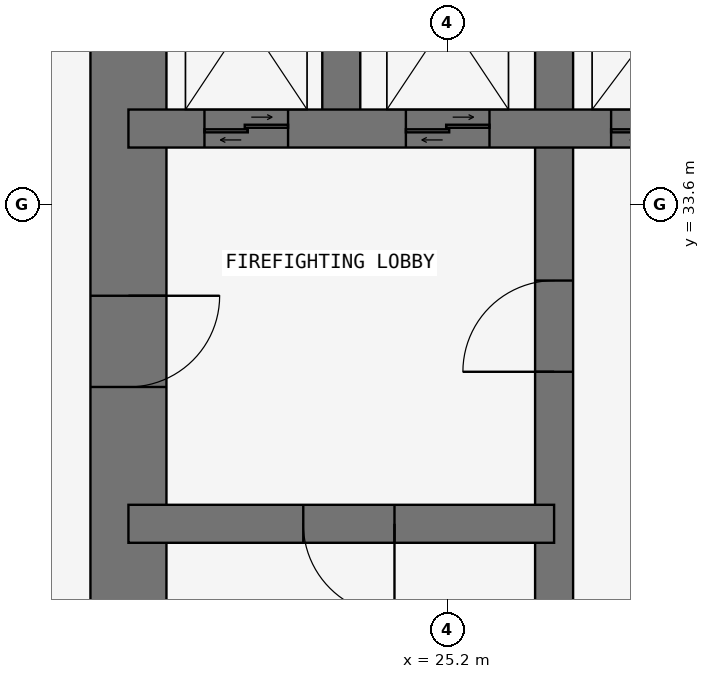
"""IFC4 building model, lengths in metres.
Left out: names, types, materials, properties, quantities, classifications, styles, units other than length and angle.
Written with IfcOpenShell. Run it as: python <this file> out.ifc"""

import sys

from ifc_helpers import new_model, si_unit, direction, frame, frame_2d, origin, place, context, subcontext, project, spatial, rectangle, extrude, element, fill, save


model = new_model("IFC4")
c1 = context("Model", 3, precision=1e-05, world=origin(), true_north=direction((0.0, 1.0)))
c2 = subcontext(c1, "Body", "Model", "MODEL_VIEW")
j1 = project(units=[si_unit("LENGTHUNIT", "METRE"), si_unit("PLANEANGLEUNIT", "RADIAN")], contexts=[c1])
p1 = place(None, origin())
s1 = spatial("IfcSite", under=j1, at=p1, CompositionType="ELEMENT")
p2 = place(p1, origin())
s2 = spatial("IfcBuilding", under=s1, at=p2, CompositionType="ELEMENT")
p3 = place(p2, frame((0.0, 0.0, 95.7)))
s3 = spatial("IfcBuildingStorey", under=s2, at=p3, CompositionType="ELEMENT", Elevation=95.7)
p4 = place(p3, frame((21.0, 37.8, 0.0), z_axis=(0.0, 0.0, 1.0), x_axis=(0.0, -1.0, 0.0)))
e1 = element("IfcWall", 1, at=p4, inside=s3, PredefinedType="SHEAR", context=c2, shape_type="SweptSolid", body=[
    extrude(rectangle(XDim=17.3, YDim=1.0, at=frame_2d((8.65, 0.0))), origin(), (0.0, 0.0, 1.0), 3.6),
])
p5 = place(p4, frame((5.4, 0.0, 0.0)))
e2 = element("IfcOpeningElement", 2, at=p5, cuts=e1, PredefinedType="OPENING", context=c2, shape_type="SweptSolid", body=[
    extrude(rectangle(XDim=1.2, YDim=2.1, at=frame_2d((0.6, 1.05))), frame((0.0, 0.51, 0.0), z_axis=(0.0, -1.0, 0.0), x_axis=(1.0, 0.0, 0.0)), (0.0, 0.0, 1.0), 1.02),
])
p6 = place(p3, frame((26.6, 21.0, 0.0), z_axis=(0.0, 0.0, 1.0), x_axis=(0.0, 1.0, 0.0)))
e3 = element("IfcWall", 3, at=p6, inside=s3, PredefinedType="SHEAR", context=c2, shape_type="SweptSolid", body=[
    extrude(rectangle(XDim=16.8, YDim=0.5, at=frame_2d((8.4, 0.0))), origin(), (0.0, 0.0, 1.0), 3.6),
])
p7 = place(p6, frame((10.4, 0.0, 0.0)))
e4 = element("IfcOpeningElement", 4, at=p7, cuts=e3, PredefinedType="OPENING", context=c2, shape_type="SweptSolid", body=[
    extrude(rectangle(XDim=1.2, YDim=2.1, at=frame_2d((0.6, 1.05))), frame((0.0, 0.26, 0.0), z_axis=(0.0, -1.0, 0.0), x_axis=(1.0, 0.0, 0.0)), (0.0, 0.0, 1.0), 0.52),
])
p8 = place(p3, frame((21.0, 29.4, 0.0), z_axis=(0.0, 0.0, 1.0), x_axis=(1.0, 0.0, 0.0)))
e5 = element("IfcWall", 5, at=p8, inside=s3, PredefinedType="SHEAR", context=c2, shape_type="SweptSolid", body=[
    extrude(rectangle(XDim=5.6, YDim=0.5, at=frame_2d((2.8, 0.0))), origin(), (0.0, 0.0, 1.0), 3.6),
])
p9 = place(p8, frame((2.3, 0.0, 0.0)))
e6 = element("IfcOpeningElement", 6, at=p9, cuts=e5, PredefinedType="OPENING", context=c2, shape_type="SweptSolid", body=[
    extrude(rectangle(XDim=1.2, YDim=2.1, at=frame_2d((0.6, 1.05))), frame((0.0, 0.26, 0.0), z_axis=(0.0, -1.0, 0.0), x_axis=(1.0, 0.0, 0.0)), (0.0, 0.0, 1.0), 0.52),
])
p10 = place(p3, frame((21.0, 34.6, 0.0), z_axis=(0.0, 0.0, 1.0), x_axis=(1.0, 0.0, 0.0)))
e7 = element("IfcWall", 7, at=p10, inside=s3, PredefinedType="SHEAR", context=c2, shape_type="SweptSolid", body=[
    extrude(rectangle(XDim=11.2, YDim=0.5, at=frame_2d((5.6, 0.0))), origin(), (0.0, 0.0, 1.0), 3.6),
])
p11 = place(p10, frame((9.35, 0.0, 0.0)))
e8 = element("IfcOpeningElement", 8, at=p11, cuts=e7, PredefinedType="OPENING", context=c2, shape_type="SweptSolid", body=[
    extrude(rectangle(XDim=0.9, YDim=2.1, at=frame_2d((0.45, 1.05))), frame((0.0, 0.26, 0.0), z_axis=(0.0, -1.0, 0.0), x_axis=(1.0, 0.0, 0.0)), (0.0, 0.0, 1.0), 0.52),
])
p12 = place(p10, frame((1.0, 0.0, 0.0)))
e9 = element("IfcOpeningElement", 9, at=p12, cuts=e7, PredefinedType="OPENING", context=c2, shape_type="SweptSolid", body=[
    extrude(rectangle(XDim=1.1, YDim=2.1, at=frame_2d((0.55, 1.05))), frame((0.0, 0.26, 0.0), z_axis=(0.0, -1.0, 0.0), x_axis=(1.0, 0.0, 0.0)), (0.0, 0.0, 1.0), 0.52),
])
p13 = place(p10, frame((3.65, 0.0, 0.0)))
e10 = element("IfcOpeningElement", 10, at=p13, cuts=e7, PredefinedType="OPENING", context=c2, shape_type="SweptSolid", body=[
    extrude(rectangle(XDim=1.1, YDim=2.1, at=frame_2d((0.55, 1.05))), frame((0.0, 0.26, 0.0), z_axis=(0.0, -1.0, 0.0), x_axis=(1.0, 0.0, 0.0)), (0.0, 0.0, 1.0), 0.52),
])
p14 = place(p10, frame((6.35, 0.0, 0.0)))
e11 = element("IfcOpeningElement", 11, at=p14, cuts=e7, PredefinedType="OPENING", context=c2, shape_type="SweptSolid", body=[
    extrude(rectangle(XDim=1.3, YDim=2.1, at=frame_2d((0.65, 1.05))), frame((0.0, 0.26, 0.0), z_axis=(0.0, -1.0, 0.0), x_axis=(1.0, 0.0, 0.0)), (0.0, 0.0, 1.0), 0.52),
])
p15 = place(p3, frame((23.8, 34.6, 0.0), z_axis=(0.0, 0.0, 1.0), x_axis=(0.0, 1.0, 0.0)))
e12 = element("IfcWall", 12, at=p15, inside=s3, PredefinedType="SHEAR", context=c2, shape_type="SweptSolid", body=[
    extrude(rectangle(XDim=3.2, YDim=0.5, at=frame_2d((1.6, 0.0))), origin(), (0.0, 0.0, 1.0), 3.6),
])
p16 = place(p5, origin())
e13 = element("IfcDoor", 13, at=p16, inside=s3, OperationType="SINGLE_SWING_LEFT", PredefinedType="DOOR", context=c2, shape_type="SweptSolid", body=[
    extrude(rectangle(XDim=1.2, YDim=2.1, at=frame_2d((0.6, 1.05))), frame((0.0, 0.025, 0.0), z_axis=(0.0, -1.0, 0.0), x_axis=(1.0, 0.0, 0.0)), (0.0, 0.0, 1.0), 0.05),
])
fill(e2, e13)
p17 = place(p9, frame((1.2, 0.0, 0.0), z_axis=(0.0, 0.0, 1.0), x_axis=(-1.0, 0.0, 0.0)))
e14 = element("IfcDoor", 14, at=p17, inside=s3, OperationType="SINGLE_SWING_LEFT", PredefinedType="DOOR", context=c2, shape_type="SweptSolid", body=[
    extrude(rectangle(XDim=1.2, YDim=2.1, at=frame_2d((0.6, 1.05))), frame((0.0, 0.025, 0.0), z_axis=(0.0, -1.0, 0.0), x_axis=(1.0, 0.0, 0.0)), (0.0, 0.0, 1.0), 0.05),
])
fill(e6, e14)
p18 = place(p7, origin())
e15 = element("IfcDoor", 15, at=p18, inside=s3, OperationType="SINGLE_SWING_LEFT", PredefinedType="DOOR", context=c2, shape_type="SweptSolid", body=[
    extrude(rectangle(XDim=1.2, YDim=2.1, at=frame_2d((0.6, 1.05))), frame((0.0, 0.025, 0.0), z_axis=(0.0, -1.0, 0.0), x_axis=(1.0, 0.0, 0.0)), (0.0, 0.0, 1.0), 0.05),
])
fill(e4, e15)
p19 = place(p12, origin())
e16 = element("IfcDoor", 16, at=p19, inside=s3, OperationType="DOUBLE_DOOR_SLIDING", PredefinedType="DOOR", context=c2, shape_type="SweptSolid", body=[
    extrude(rectangle(XDim=1.1, YDim=2.1, at=frame_2d((0.55, 1.05))), frame((0.0, 0.025, 0.0), z_axis=(0.0, -1.0, 0.0), x_axis=(1.0, 0.0, 0.0)), (0.0, 0.0, 1.0), 0.05),
])
fill(e9, e16)
p20 = place(p13, origin())
e17 = element("IfcDoor", 17, at=p20, inside=s3, OperationType="DOUBLE_DOOR_SLIDING", PredefinedType="DOOR", context=c2, shape_type="SweptSolid", body=[
    extrude(rectangle(XDim=1.1, YDim=2.1, at=frame_2d((0.55, 1.05))), frame((0.0, 0.025, 0.0), z_axis=(0.0, -1.0, 0.0), x_axis=(1.0, 0.0, 0.0)), (0.0, 0.0, 1.0), 0.05),
])
fill(e10, e17)
p21 = place(p14, origin())
e18 = element("IfcDoor", 18, at=p21, inside=s3, OperationType="DOUBLE_DOOR_SLIDING", PredefinedType="DOOR", context=c2, shape_type="SweptSolid", body=[
    extrude(rectangle(XDim=1.3, YDim=2.1, at=frame_2d((0.65, 1.05))), frame((0.0, 0.025, 0.0), z_axis=(0.0, -1.0, 0.0), x_axis=(1.0, 0.0, 0.0)), (0.0, 0.0, 1.0), 0.05),
])
fill(e11, e18)
save(model, sys.argv[1])
